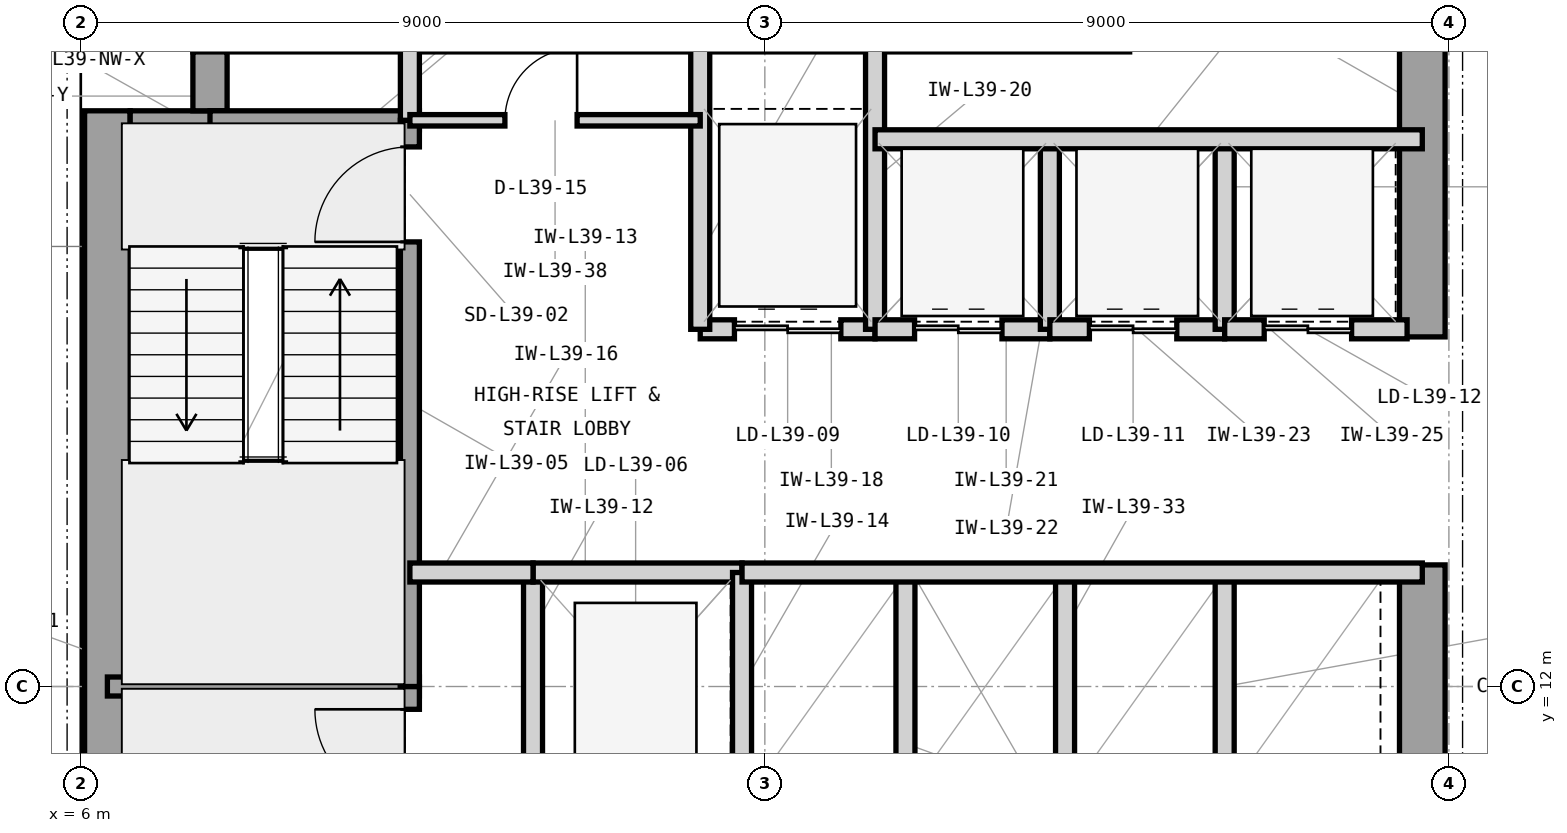
"""IFC4 building model, lengths in metres.
Left out: names, types, materials, properties, quantities, classifications, styles, units other than length and angle.
Written with IfcOpenShell. Run it as: python <this file> out.ifc"""

import sys

from ifc_helpers import new_model, si_unit, direction, frame, frame_2d, origin, place, context, subcontext, project, spatial, rectangle, extrude, element, fill, save


model = new_model("IFC4")
c1 = context("Model", 3, precision=1e-05, world=origin(), true_north=direction((0.0, 1.0)))
c2 = subcontext(c1, "Body", "Model", "MODEL_VIEW")
j1 = project(units=[si_unit("LENGTHUNIT", "METRE"), si_unit("PLANEANGLEUNIT", "RADIAN")], contexts=[c1])
p1 = place(None, origin())
s1 = spatial("IfcSite", under=j1, at=p1, CompositionType="ELEMENT")
p2 = place(p1, origin())
s2 = spatial("IfcBuilding", under=s1, at=p2, CompositionType="ELEMENT")
p3 = place(p2, frame((0.0, 0.0, 164.4)))
s3 = spatial("IfcBuildingStorey", under=s2, at=p3, CompositionType="ELEMENT", Elevation=164.4)
p4 = place(p3, frame((6.35, 4.425, 0.0), z_axis=(0.0, 0.0, 1.0), x_axis=(0.0, 1.0, 0.0)))
e1 = element("IfcWall", 1, at=p4, inside=s3, PredefinedType="SHEAR", context=c2, shape_type="SweptSolid", body=[
    extrude(rectangle(XDim=15.15, YDim=0.6, at=frame_2d((7.575, 0.0))), origin(), (0.0, 0.0, 1.0), 3.9),
])
p5 = place(p3, frame((7.475, 20.65, 0.0), z_axis=(0.0, 0.0, 1.0), x_axis=(1.0, 0.0, 0.0)))
e2 = element("IfcWall", 2, at=p5, inside=s3, PredefinedType="SHEAR", context=c2, shape_type="SweptSolid", body=[
    extrude(rectangle(XDim=12.325, YDim=0.6, at=frame_2d((6.163, 0.0))), origin(), (0.0, 0.0, 1.0), 3.9),
])
p6 = place(p3, frame((23.65, 10.4, 0.0), z_axis=(0.0, 0.0, 1.0), x_axis=(0.0, 1.0, 0.0)))
e3 = element("IfcWall", 3, at=p6, inside=s3, PredefinedType="SHEAR", context=c2, shape_type="SweptSolid", body=[
    extrude(rectangle(XDim=3.2, YDim=0.6, at=frame_2d((1.6, 0.0))), origin(), (0.0, 0.0, 1.0), 3.9),
])
p7 = place(p3, frame((23.65, 16.6, 0.0), z_axis=(0.0, 0.0, 1.0), x_axis=(0.0, 1.0, 0.0)))
e4 = element("IfcWall", 4, at=p7, inside=s3, PredefinedType="SHEAR", context=c2, shape_type="SweptSolid", body=[
    extrude(rectangle(XDim=4.05, YDim=0.6, at=frame_2d((2.025, 0.0))), origin(), (0.0, 0.0, 1.0), 3.9),
])
p8 = place(p3, frame((6.65, 19.35, 0.0), z_axis=(0.0, 0.0, 1.0), x_axis=(1.0, 0.0, 0.0)))
e5 = element("IfcWall", 5, at=p8, inside=s3, PredefinedType="SHEAR", context=c2, shape_type="SweptSolid", body=[
    extrude(rectangle(XDim=1.275, YDim=0.45, at=frame_2d((0.638, 0.0))), origin(), (0.0, 0.0, 1.0), 3.9),
])
p9 = place(p3, frame((7.7, 19.575, 0.0), z_axis=(0.0, 0.0, 1.0), x_axis=(0.0, 1.0, 0.0)))
e6 = element("IfcWall", 6, at=p9, inside=s3, PredefinedType="SHEAR", context=c2, shape_type="SweptSolid", body=[
    extrude(rectangle(XDim=0.775, YDim=0.45, at=frame_2d((0.388, 0.0))), origin(), (0.0, 0.0, 1.0), 3.9),
])
p10 = place(p3, frame((6.35, 12.0, 0.0), z_axis=(0.0, 0.0, 1.0), x_axis=(1.0, 0.0, 0.0)))
e7 = element("IfcWall", 7, at=p10, inside=s3, PredefinedType="SHEAR", context=c2, shape_type="SweptSolid", body=[
    extrude(rectangle(XDim=4.105, YDim=0.25, at=frame_2d((2.052, 0.0))), origin(), (0.0, 0.0, 1.0), 3.9),
])
p11 = place(p3, frame((7.7, 19.45, 0.0), z_axis=(0.0, 0.0, 1.0), x_axis=(1.0, 0.0, 0.0)))
e8 = element("IfcWall", 8, at=p11, inside=s3, PredefinedType="SHEAR", context=c2, shape_type="SweptSolid", body=[
    extrude(rectangle(XDim=2.755, YDim=0.25, at=frame_2d((1.377, 0.0))), origin(), (0.0, 0.0, 1.0), 3.9),
])
p12 = place(p3, frame((10.33, 4.55, 0.0), z_axis=(0.0, 0.0, 1.0), x_axis=(0.0, 1.0, 0.0)))
e9 = element("IfcWall", 9, at=p12, inside=s3, PredefinedType="SHEAR", context=c2, shape_type="SweptSolid", body=[
    extrude(rectangle(XDim=7.45, YDim=0.25, at=frame_2d((3.725, 0.0))), origin(), (0.0, 0.0, 1.0), 3.9),
])
p13 = place(p12, frame((5.9, 0.0, 0.0)))
e10 = element("IfcOpeningElement", 10, at=p13, cuts=e9, PredefinedType="OPENING", context=c2, shape_type="SweptSolid", body=[
    extrude(rectangle(XDim=1.25, YDim=2.2, at=frame_2d((0.625, 1.1))), frame((0.0, 0.135, 0.0), z_axis=(0.0, -1.0, 0.0), x_axis=(1.0, 0.0, 0.0)), (0.0, 0.0, 1.0), 0.27),
])
p14 = place(p3, frame((10.33, 12.0, 0.0), z_axis=(0.0, 0.0, 1.0), x_axis=(0.0, 1.0, 0.0)))
e11 = element("IfcWall", 11, at=p14, inside=s3, PredefinedType="SHEAR", context=c2, shape_type="SweptSolid", body=[
    extrude(rectangle(XDim=7.45, YDim=0.25, at=frame_2d((3.725, 0.0))), origin(), (0.0, 0.0, 1.0), 3.9),
])
p15 = place(p14, frame((5.85, 0.0, 0.0)))
e12 = element("IfcOpeningElement", 12, at=p15, cuts=e11, PredefinedType="OPENING", context=c2, shape_type="SweptSolid", body=[
    extrude(rectangle(XDim=1.25, YDim=2.2, at=frame_2d((0.625, 1.1))), frame((0.0, 0.135, 0.0), z_axis=(0.0, -1.0, 0.0), x_axis=(1.0, 0.0, 0.0)), (0.0, 0.0, 1.0), 0.27),
])
p16 = place(p3, frame((10.33, 19.45, 0.0), z_axis=(0.0, 0.0, 1.0), x_axis=(0.0, 1.0, 0.0)))
e13 = element("IfcWall", 13, at=p16, inside=s3, PredefinedType="PARTITIONING", context=c2, shape_type="SweptSolid", body=[
    extrude(rectangle(XDim=1.2, YDim=0.25, at=frame_2d((0.6, 0.0))), origin(), (0.0, 0.0, 1.0), 3.073),
])
p17 = place(p3, frame((11.95, 10.5, 0.0), z_axis=(0.0, 0.0, 1.0), x_axis=(0.0, 1.0, 0.0)))
e14 = element("IfcWall", 14, at=p17, inside=s3, PredefinedType="PARTITIONING", context=c2, shape_type="SweptSolid", body=[
    extrude(rectangle(XDim=3.0, YDim=0.25, at=frame_2d((1.5, 0.0))), origin(), (0.0, 0.0, 1.0), 3.69),
])
p18 = place(p3, frame((11.95, 13.5, 0.0), z_axis=(0.0, 0.0, 1.0), x_axis=(1.0, 0.0, 0.0)))
e15 = element("IfcWall", 15, at=p18, inside=s3, PredefinedType="PARTITIONING", context=c2, shape_type="SweptSolid", body=[
    extrude(rectangle(XDim=2.75, YDim=0.25, at=frame_2d((1.375, 0.0))), origin(), (0.0, 0.0, 1.0), 3.283),
])
p19 = place(p3, frame((14.7, 10.5, 0.0), z_axis=(0.0, 0.0, 1.0), x_axis=(0.0, 1.0, 0.0)))
e16 = element("IfcWall", 16, at=p19, inside=s3, PredefinedType="PARTITIONING", context=c2, shape_type="SweptSolid", body=[
    extrude(rectangle(XDim=3.0, YDim=0.25, at=frame_2d((1.5, 0.0))), origin(), (0.0, 0.0, 1.0), 3.69),
])
p20 = place(p3, frame((10.33, 13.5, 0.0), z_axis=(0.0, 0.0, 1.0), x_axis=(1.0, 0.0, 0.0)))
e17 = element("IfcWall", 17, at=p20, inside=s3, PredefinedType="PARTITIONING", context=c2, shape_type="SweptSolid", body=[
    extrude(rectangle(XDim=1.62, YDim=0.25, at=frame_2d((0.81, 0.0))), origin(), (0.0, 0.0, 1.0), 3.283),
])
p21 = place(p3, frame((14.15, 16.7, 0.0), z_axis=(0.0, 0.0, 1.0), x_axis=(1.0, 0.0, 0.0)))
e18 = element("IfcWall", 18, at=p21, inside=s3, PredefinedType="PARTITIONING", context=c2, shape_type="SweptSolid", body=[
    extrude(rectangle(XDim=2.3, YDim=0.25, at=frame_2d((1.15, 0.0))), origin(), (0.0, 0.0, 1.0), 3.283),
])
p22 = place(p21, frame((0.45, 0.0, 0.0)))
e19 = element("IfcOpeningElement", 19, at=p22, cuts=e18, PredefinedType="OPENING", context=c2, shape_type="SweptSolid", body=[
    extrude(rectangle(XDim=1.4, YDim=2.35, at=frame_2d((0.7, 1.175))), frame((0.0, 0.135, 0.0), z_axis=(0.0, -1.0, 0.0), x_axis=(1.0, 0.0, 0.0)), (0.0, 0.0, 1.0), 0.27),
])
for number, where, z_axis, x_axis in (
    (20, (14.15, 16.7, 0.0), (0.0, 0.0, 1.0), (0.0, 1.0, 0.0)),
    (21, (16.45, 16.7, 0.0), (0.0, 0.0, 1.0), (0.0, 1.0, 0.0)),
):
    element("IfcWall", number, at=place(p3, frame(where, z_axis=z_axis, x_axis=x_axis)), inside=s3, PredefinedType="PARTITIONING", context=c2, shape_type="SweptSolid", body=[
        extrude(rectangle(XDim=3.95, YDim=0.25, at=frame_2d((1.975, 0.0))), origin(), (0.0, 0.0, 1.0), 3.69),
    ])
p23 = place(p3, frame((16.45, 16.7, 0.0), z_axis=(0.0, 0.0, 1.0), x_axis=(1.0, 0.0, 0.0)))
e22 = element("IfcWall", 22, at=p23, inside=s3, PredefinedType="PARTITIONING", context=c2, shape_type="SweptSolid", body=[
    extrude(rectangle(XDim=2.3, YDim=0.25, at=frame_2d((1.15, 0.0))), origin(), (0.0, 0.0, 1.0), 3.283),
])
p24 = place(p23, frame((0.52, 0.0, 0.0)))
e23 = element("IfcOpeningElement", 23, at=p24, cuts=e22, PredefinedType="OPENING", context=c2, shape_type="SweptSolid", body=[
    extrude(rectangle(XDim=1.15, YDim=2.25, at=frame_2d((0.575, 1.125))), frame((0.0, 0.135, 0.0), z_axis=(0.0, -1.0, 0.0), x_axis=(1.0, 0.0, 0.0)), (0.0, 0.0, 1.0), 0.27),
])
p25 = place(p3, frame((18.75, 16.7, 0.0), z_axis=(0.0, 0.0, 1.0), x_axis=(0.0, 1.0, 0.0)))
e24 = element("IfcWall", 24, at=p25, inside=s3, PredefinedType="PARTITIONING", context=c2, shape_type="SweptSolid", body=[
    extrude(rectangle(XDim=2.5, YDim=0.25, at=frame_2d((1.25, 0.0))), origin(), (0.0, 0.0, 1.0), 3.69),
])
p26 = place(p3, frame((18.75, 16.7, 0.0), z_axis=(0.0, 0.0, 1.0), x_axis=(1.0, 0.0, 0.0)))
e25 = element("IfcWall", 25, at=p26, inside=s3, PredefinedType="PARTITIONING", context=c2, shape_type="SweptSolid", body=[
    extrude(rectangle(XDim=2.3, YDim=0.25, at=frame_2d((1.15, 0.0))), origin(), (0.0, 0.0, 1.0), 3.283),
])
p27 = place(p26, frame((0.52, 0.0, 0.0)))
e26 = element("IfcOpeningElement", 26, at=p27, cuts=e25, PredefinedType="OPENING", context=c2, shape_type="SweptSolid", body=[
    extrude(rectangle(XDim=1.15, YDim=2.25, at=frame_2d((0.575, 1.125))), frame((0.0, 0.135, 0.0), z_axis=(0.0, -1.0, 0.0), x_axis=(1.0, 0.0, 0.0)), (0.0, 0.0, 1.0), 0.27),
])
p28 = place(p3, frame((21.05, 16.7, 0.0), z_axis=(0.0, 0.0, 1.0), x_axis=(0.0, 1.0, 0.0)))
e27 = element("IfcWall", 27, at=p28, inside=s3, PredefinedType="PARTITIONING", context=c2, shape_type="SweptSolid", body=[
    extrude(rectangle(XDim=2.5, YDim=0.25, at=frame_2d((1.25, 0.0))), origin(), (0.0, 0.0, 1.0), 3.69),
])
p29 = place(p3, frame((21.05, 16.7, 0.0), z_axis=(0.0, 0.0, 1.0), x_axis=(1.0, 0.0, 0.0)))
e28 = element("IfcWall", 28, at=p29, inside=s3, PredefinedType="PARTITIONING", context=c2, shape_type="SweptSolid", body=[
    extrude(rectangle(XDim=2.4, YDim=0.25, at=frame_2d((1.2, 0.0))), origin(), (0.0, 0.0, 1.0), 3.283),
])
p30 = place(p29, frame((0.52, 0.0, 0.0)))
e29 = element("IfcOpeningElement", 29, at=p30, cuts=e28, PredefinedType="OPENING", context=c2, shape_type="SweptSolid", body=[
    extrude(rectangle(XDim=1.15, YDim=2.25, at=frame_2d((0.575, 1.125))), frame((0.0, 0.135, 0.0), z_axis=(0.0, -1.0, 0.0), x_axis=(1.0, 0.0, 0.0)), (0.0, 0.0, 1.0), 0.27),
])
p31 = place(p3, frame((16.45, 19.2, 0.0), z_axis=(0.0, 0.0, 1.0), x_axis=(1.0, 0.0, 0.0)))
e30 = element("IfcWall", 30, at=p31, inside=s3, PredefinedType="PARTITIONING", context=c2, shape_type="SweptSolid", body=[
    extrude(rectangle(XDim=7.2, YDim=0.25, at=frame_2d((3.6, 0.0))), origin(), (0.0, 0.0, 1.0), 3.69),
])
for number, where, z_axis, x_axis in (
    (31, (16.85, 10.5, 0.0), (0.0, 0.0, 1.0), (0.0, 1.0, 0.0)),
    (32, (18.95, 10.5, 0.0), (0.0, 0.0, 1.0), (0.0, 1.0, 0.0)),
    (33, (21.05, 10.5, 0.0), (0.0, 0.0, 1.0), (0.0, 1.0, 0.0)),
):
    element("IfcWall", number, at=place(p3, frame(where, z_axis=z_axis, x_axis=x_axis)), inside=s3, PredefinedType="PARTITIONING", context=c2, shape_type="SweptSolid", body=[
        extrude(rectangle(XDim=3.0, YDim=0.25, at=frame_2d((1.5, 0.0))), origin(), (0.0, 0.0, 1.0), 3.69),
    ])
p32 = place(p3, frame((14.7, 13.5, 0.0), z_axis=(0.0, 0.0, 1.0), x_axis=(1.0, 0.0, 0.0)))
e34 = element("IfcWall", 34, at=p32, inside=s3, PredefinedType="PARTITIONING", context=c2, shape_type="SweptSolid", body=[
    extrude(rectangle(XDim=8.95, YDim=0.25, at=frame_2d((4.475, 0.0))), origin(), (0.0, 0.0, 1.0), 3.283),
])
p33 = place(p3, frame((10.33, 19.45, 0.0), z_axis=(0.0, 0.0, 1.0), x_axis=(1.0, 0.0, 0.0)))
e35 = element("IfcWall", 35, at=p33, inside=s3, PredefinedType="PARTITIONING", context=c2, shape_type="SweptSolid", body=[
    extrude(rectangle(XDim=3.82, YDim=0.15, at=frame_2d((1.91, 0.0))), origin(), (0.0, 0.0, 1.0), 3.69),
])
p34 = place(p33, frame((1.25, 0.0, 0.0)))
e36 = element("IfcOpeningElement", 36, at=p34, cuts=e35, PredefinedType="OPENING", context=c2, shape_type="SweptSolid", body=[
    extrude(rectangle(XDim=0.95, YDim=2.1, at=frame_2d((0.475, 1.05))), frame((0.0, 0.085, 0.0), z_axis=(0.0, -1.0, 0.0), x_axis=(1.0, 0.0, 0.0)), (0.0, 0.0, 1.0), 0.17),
])
p35 = place(p13, origin())
e37 = element("IfcDoor", 37, at=p35, inside=s3, OperationType="SINGLE_SWING_RIGHT", PredefinedType="DOOR", context=c2, shape_type="SweptSolid", body=[
    extrude(rectangle(XDim=1.25, YDim=2.2, at=frame_2d((0.625, 1.1))), frame((0.0, 0.025, 0.0), z_axis=(0.0, -1.0, 0.0), x_axis=(1.0, 0.0, 0.0)), (0.0, 0.0, 1.0), 0.05),
])
fill(e10, e37)
p36 = place(p15, origin())
e38 = element("IfcDoor", 38, at=p36, inside=s3, OperationType="SINGLE_SWING_LEFT", PredefinedType="DOOR", context=c2, shape_type="SweptSolid", body=[
    extrude(rectangle(XDim=1.25, YDim=2.2, at=frame_2d((0.625, 1.1))), frame((0.0, 0.025, 0.0), z_axis=(0.0, -1.0, 0.0), x_axis=(1.0, 0.0, 0.0)), (0.0, 0.0, 1.0), 0.05),
])
fill(e12, e38)
p37 = place(p22, origin())
e39 = element("IfcDoor", 39, at=p37, inside=s3, OperationType="DOUBLE_DOOR_SLIDING", PredefinedType="DOOR", context=c2, shape_type="SweptSolid", body=[
    extrude(rectangle(XDim=1.4, YDim=2.35, at=frame_2d((0.7, 1.175))), frame((0.0, 0.025, 0.0), z_axis=(0.0, -1.0, 0.0), x_axis=(1.0, 0.0, 0.0)), (0.0, 0.0, 1.0), 0.05),
])
fill(e19, e39)
p38 = place(p24, origin())
e40 = element("IfcDoor", 40, at=p38, inside=s3, OperationType="DOUBLE_DOOR_SLIDING", PredefinedType="DOOR", context=c2, shape_type="SweptSolid", body=[
    extrude(rectangle(XDim=1.15, YDim=2.25, at=frame_2d((0.575, 1.125))), frame((0.0, 0.025, 0.0), z_axis=(0.0, -1.0, 0.0), x_axis=(1.0, 0.0, 0.0)), (0.0, 0.0, 1.0), 0.05),
])
fill(e23, e40)
p39 = place(p27, origin())
e41 = element("IfcDoor", 41, at=p39, inside=s3, OperationType="DOUBLE_DOOR_SLIDING", PredefinedType="DOOR", context=c2, shape_type="SweptSolid", body=[
    extrude(rectangle(XDim=1.15, YDim=2.25, at=frame_2d((0.575, 1.125))), frame((0.0, 0.025, 0.0), z_axis=(0.0, -1.0, 0.0), x_axis=(1.0, 0.0, 0.0)), (0.0, 0.0, 1.0), 0.05),
])
fill(e26, e41)
p40 = place(p30, origin())
e42 = element("IfcDoor", 42, at=p40, inside=s3, OperationType="DOUBLE_DOOR_SLIDING", PredefinedType="DOOR", context=c2, shape_type="SweptSolid", body=[
    extrude(rectangle(XDim=1.15, YDim=2.25, at=frame_2d((0.575, 1.125))), frame((0.0, 0.025, 0.0), z_axis=(0.0, -1.0, 0.0), x_axis=(1.0, 0.0, 0.0)), (0.0, 0.0, 1.0), 0.05),
])
fill(e29, e42)
p41 = place(p34, origin())
e43 = element("IfcDoor", 43, at=p41, inside=s3, OperationType="SINGLE_SWING_RIGHT", PredefinedType="DOOR", context=c2, shape_type="SweptSolid", body=[
    extrude(rectangle(XDim=0.95, YDim=2.1, at=frame_2d((0.475, 1.05))), frame((0.0, 0.025, 0.0), z_axis=(0.0, -1.0, 0.0), x_axis=(1.0, 0.0, 0.0)), (0.0, 0.0, 1.0), 0.05),
])
fill(e36, e43)
save(model, sys.argv[1])
